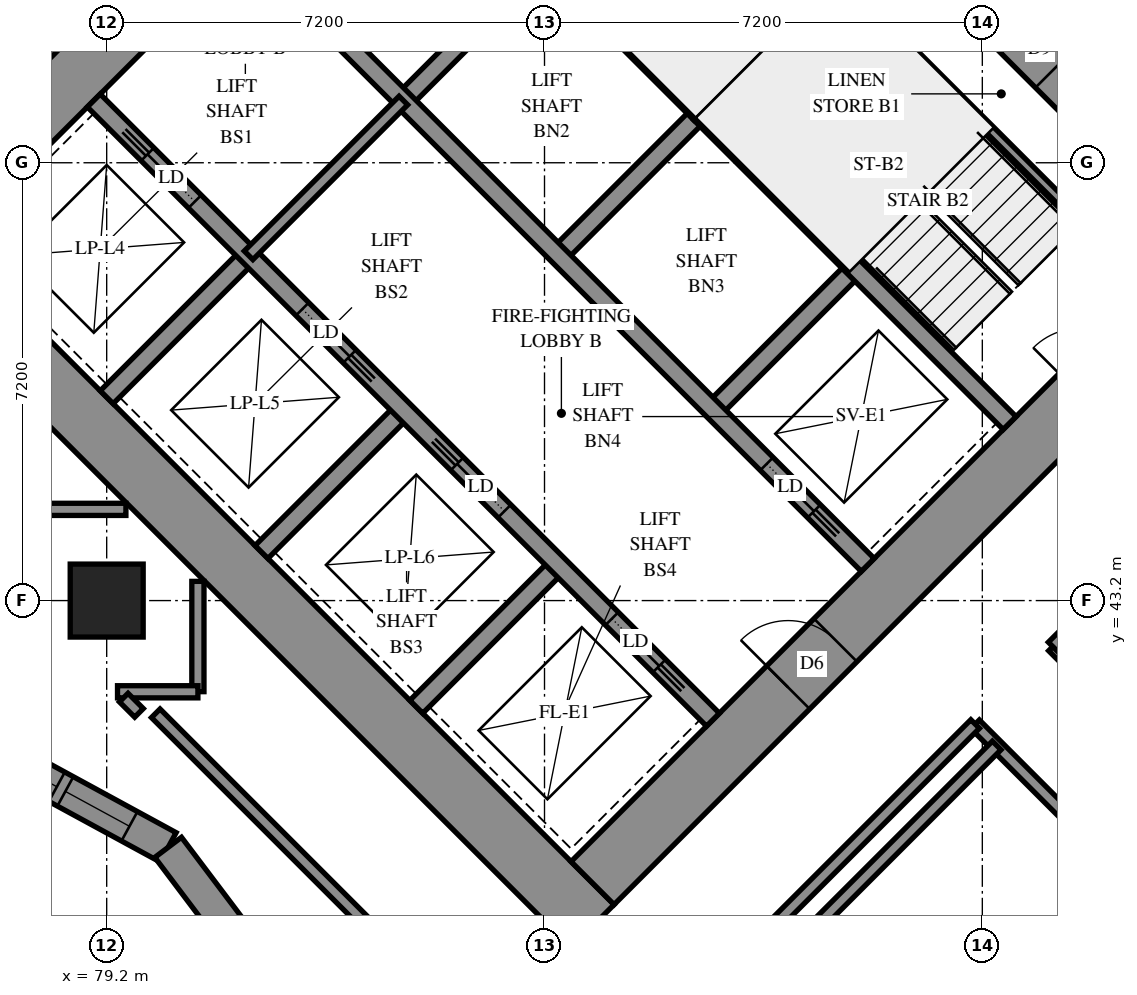
"""IFC4 building model, lengths in metres.
Left out: names, types, materials, properties, quantities, classifications, styles, units other than length and angle.
Written with IfcOpenShell. Run it as: python <this file> out.ifc"""

import sys

from ifc_helpers import new_model, si_unit, direction, frame, frame_2d, origin, origin_2d, place, context, subcontext, project, spatial, polyline, rectangle, outline, extrude, element, fill, save


model = new_model("IFC4")
c1 = context("Model", 3, precision=1e-05, world=origin(), true_north=direction((0.0, 1.0)))
c2 = subcontext(c1, "Body", "Model", "MODEL_VIEW")
j1 = project(units=[si_unit("LENGTHUNIT", "METRE"), si_unit("PLANEANGLEUNIT", "RADIAN")], contexts=[c1])
p1 = place(None, origin())
s1 = spatial("IfcSite", under=j1, at=p1, CompositionType="ELEMENT")
p2 = place(p1, origin())
s2 = spatial("IfcBuilding", under=s1, at=p2, CompositionType="ELEMENT")
p3 = place(p2, frame((0.0, 0.0, 54.2)))
s3 = spatial("IfcBuildingStorey", under=s2, at=p3, CompositionType="ELEMENT", Elevation=54.2)
p4 = place(p3, frame((79.2, 43.2, 0.0), z_axis=(0.0, 0.0, 1.0), x_axis=(1.0, 0.0, 0.0)))
e1 = element("IfcColumn", 1, at=p4, inside=s3, PredefinedType="COLUMN", context=c2, shape_type="SweptSolid", body=[
    extrude(rectangle(XDim=1.2, YDim=1.2, at=origin_2d()), origin(), (0.0, 0.0, 1.0), 3.1),
])
p5 = place(p3, frame((75.594, 49.443, -0.3), z_axis=(0.0, 0.0, 1.0), x_axis=(0.7071037324, -0.70710983, 0.0)))
e2 = element("IfcWall", 2, at=p5, inside=s3, PredefinedType="SHEAR", context=c2, shape_type="SweptSolid", body=[
    extrude(rectangle(XDim=16.4, YDim=1.0, at=frame_2d((8.2, 0.0))), origin(), (0.0, 0.0, 1.0), 2.7),
])
p6 = place(p3, frame((86.483, 60.333, -0.3), z_axis=(0.0, 0.0, 1.0), x_axis=(0.70710983, -0.7071037324, 0.0)))
e3 = element("IfcWall", 3, at=p6, inside=s3, PredefinedType="SHEAR", context=c2, shape_type="SweptSolid", body=[
    extrude(rectangle(XDim=16.4, YDim=1.0, at=frame_2d((8.2, 0.0))), origin(), (0.0, 0.0, 1.0), 2.7),
])
p7 = place(p6, frame((11.0, 0.0, 0.3)))
e4 = element("IfcOpeningElement", 4, at=p7, cuts=e3, PredefinedType="OPENING", context=c2, shape_type="SweptSolid", body=[
    extrude(rectangle(XDim=0.8, YDim=2.1, at=frame_2d((0.4, 1.05))), frame((0.0, 0.51, 0.0), z_axis=(0.0, -1.0, 0.0), x_axis=(1.0, 0.0, 0.0)), (0.0, 0.0, 1.0), 1.02),
])
p8 = place(p3, frame((76.301, 49.443, -0.3), z_axis=(0.0, 0.0, 1.0), x_axis=(0.7071067812, 0.7071067812, 0.0)))
e5 = element("IfcWall", 5, at=p8, inside=s3, PredefinedType="SHEAR", context=c2, shape_type="SweptSolid", body=[
    extrude(rectangle(XDim=14.4, YDim=1.0, at=frame_2d((7.2, 0.0))), origin(), (0.0, 0.0, 1.0), 2.7),
])
p9 = place(p8, frame((4.55, 0.0, 0.3)))
e6 = element("IfcOpeningElement", 6, at=p9, cuts=e5, PredefinedType="OPENING", context=c2, shape_type="SweptSolid", body=[
    extrude(rectangle(XDim=1.1, YDim=2.1, at=frame_2d((0.55, 1.05))), frame((0.0, 0.51, 0.0), z_axis=(0.0, -1.0, 0.0), x_axis=(1.0, 0.0, 0.0)), (0.0, 0.0, 1.0), 1.02),
])
p10 = place(p8, frame((11.35, 0.0, 0.3)))
e7 = element("IfcOpeningElement", 7, at=p10, cuts=e5, PredefinedType="OPENING", context=c2, shape_type="SweptSolid", body=[
    extrude(rectangle(XDim=1.1, YDim=2.1, at=frame_2d((0.55, 1.05))), frame((0.0, 0.51, 0.0), z_axis=(0.0, -1.0, 0.0), x_axis=(1.0, 0.0, 0.0)), (0.0, 0.0, 1.0), 1.02),
])
p11 = place(p3, frame((87.19, 38.554, -0.3), z_axis=(0.0, 0.0, 1.0), x_axis=(0.707103309, 0.7071102534, 0.0)))
e8 = element("IfcWall", 8, at=p11, inside=s3, PredefinedType="SHEAR", context=c2, shape_type="SweptSolid", body=[
    extrude(rectangle(XDim=14.4, YDim=1.0, at=frame_2d((7.2, 0.0))), origin(), (0.0, 0.0, 1.0), 2.7),
])
p12 = place(p11, frame((4.55, 0.0, 0.3)))
e9 = element("IfcOpeningElement", 9, at=p12, cuts=e8, PredefinedType="OPENING", context=c2, shape_type="SweptSolid", body=[
    extrude(rectangle(XDim=1.1, YDim=2.1, at=frame_2d((0.55, 1.05))), frame((0.0, 0.51, 0.0), z_axis=(0.0, -1.0, 0.0), x_axis=(1.0, 0.0, 0.0)), (0.0, 0.0, 1.0), 1.02),
])
p13 = place(p11, frame((11.35, 0.0, 0.3)))
e10 = element("IfcOpeningElement", 10, at=p13, cuts=e8, PredefinedType="OPENING", context=c2, shape_type="SweptSolid", body=[
    extrude(rectangle(XDim=1.1, YDim=2.1, at=frame_2d((0.55, 1.05))), frame((0.0, 0.51, 0.0), z_axis=(0.0, -1.0, 0.0), x_axis=(1.0, 0.0, 0.0)), (0.0, 0.0, 1.0), 1.02),
])
for number, where, z_axis, x_axis in (
    (11, (79.2, 46.544, 0.0), (0.0, 0.0, 1.0), (0.707, 0.707, 0.0)),
    (12, (84.079, 51.423, 0.0), (0.0, 0.0, 1.0), (0.707, 0.707, 0.0)),
):
    element("IfcWall", number, at=place(p3, frame(where, z_axis=z_axis, x_axis=x_axis)), inside=s3, PredefinedType="SOLIDWALL", context=c2, shape_type="SweptSolid", body=[
        extrude(rectangle(XDim=3.3, YDim=0.3, at=frame_2d((1.65, 0.0))), origin(), (0.0, 0.0, 1.0), 3.1),
    ])
p14 = place(p3, frame((81.746, 43.999, 0.0), z_axis=(0.0, 0.0, 1.0), x_axis=(0.7071067812, 0.7071067812, 0.0)))
e13 = element("IfcWall", 13, at=p14, inside=s3, PredefinedType="SOLIDWALL", context=c2, shape_type="SweptSolid", body=[
    extrude(rectangle(XDim=3.3, YDim=0.3, at=frame_2d((1.65, 0.0))), origin(), (0.0, 0.0, 1.0), 3.1),
])
p15 = place(p3, frame((86.625, 48.878, 0.0), z_axis=(0.0, 0.0, 1.0), x_axis=(0.7071067812, 0.7071067812, 0.0)))
e14 = element("IfcWall", 14, at=p15, inside=s3, PredefinedType="SOLIDWALL", context=c2, shape_type="SweptSolid", body=[
    extrude(rectangle(XDim=3.3, YDim=0.3, at=frame_2d((1.65, 0.0))), origin(), (0.0, 0.0, 1.0), 3.1),
])
p16 = place(p3, frame((84.291, 41.453, 0.0), z_axis=(0.0, 0.0, 1.0), x_axis=(0.7071067812, 0.7071067812, 0.0)))
e15 = element("IfcWall", 15, at=p16, inside=s3, PredefinedType="SOLIDWALL", context=c2, shape_type="SweptSolid", body=[
    extrude(rectangle(XDim=3.3, YDim=0.3, at=frame_2d((1.65, 0.0))), origin(), (0.0, 0.0, 1.0), 3.1),
])
p17 = place(p3, frame((89.17, 46.332, 0.0), z_axis=(0.0, 0.0, 1.0), x_axis=(0.7071067812, 0.7071067812, 0.0)))
e16 = element("IfcWall", 16, at=p17, inside=s3, PredefinedType="SOLIDWALL", context=c2, shape_type="SweptSolid", body=[
    extrude(rectangle(XDim=3.3, YDim=0.3, at=frame_2d((1.65, 0.0))), origin(), (0.0, 0.0, 1.0), 3.1),
])
p18 = place(p3, frame((78.988, 51.423, 0.0), z_axis=(0.0, 0.0, 1.0), x_axis=(0.7071067812, -0.7071067812, 0.0)))
e17 = element("IfcWall", 17, at=p18, inside=s3, PredefinedType="SOLIDWALL", context=c2, shape_type="SweptSolid", body=[
    extrude(rectangle(XDim=14.4, YDim=0.3, at=frame_2d((7.2, 0.0))), origin(), (0.0, 0.0, 1.0), 3.1),
])
p19 = place(p18, frame((1.25, 0.0, 0.0)))
e18 = element("IfcOpeningElement", 18, at=p19, cuts=e17, PredefinedType="OPENING", context=c2, shape_type="SweptSolid", body=[
    extrude(rectangle(XDim=1.1, YDim=2.1, at=frame_2d((0.55, 1.05))), frame((0.0, 0.16, 0.0), z_axis=(0.0, -1.0, 0.0), x_axis=(1.0, 0.0, 0.0)), (0.0, 0.0, 1.0), 0.32),
])
p20 = place(p18, frame((4.85, 0.0, 0.0)))
e19 = element("IfcOpeningElement", 19, at=p20, cuts=e17, PredefinedType="OPENING", context=c2, shape_type="SweptSolid", body=[
    extrude(rectangle(XDim=1.1, YDim=2.1, at=frame_2d((0.55, 1.05))), frame((0.0, 0.16, 0.0), z_axis=(0.0, -1.0, 0.0), x_axis=(1.0, 0.0, 0.0)), (0.0, 0.0, 1.0), 0.32),
])
p21 = place(p18, frame((8.45, 0.0, 0.0)))
e20 = element("IfcOpeningElement", 20, at=p21, cuts=e17, PredefinedType="OPENING", context=c2, shape_type="SweptSolid", body=[
    extrude(rectangle(XDim=1.1, YDim=2.1, at=frame_2d((0.55, 1.05))), frame((0.0, 0.16, 0.0), z_axis=(0.0, -1.0, 0.0), x_axis=(1.0, 0.0, 0.0)), (0.0, 0.0, 1.0), 0.32),
])
p22 = place(p18, frame((12.05, 0.0, 0.0)))
e21 = element("IfcOpeningElement", 21, at=p22, cuts=e17, PredefinedType="OPENING", context=c2, shape_type="SweptSolid", body=[
    extrude(rectangle(XDim=1.1, YDim=2.1, at=frame_2d((0.55, 1.05))), frame((0.0, 0.16, 0.0), z_axis=(0.0, -1.0, 0.0), x_axis=(1.0, 0.0, 0.0)), (0.0, 0.0, 1.0), 0.32),
])
p23 = place(p3, frame((81.534, 53.969, 0.0), z_axis=(0.0, 0.0, 1.0), x_axis=(0.707103309, -0.7071102534, 0.0)))
e22 = element("IfcWall", 22, at=p23, inside=s3, PredefinedType="SOLIDWALL", context=c2, shape_type="SweptSolid", body=[
    extrude(rectangle(XDim=14.4, YDim=0.3, at=frame_2d((7.2, 0.0))), origin(), (0.0, 0.0, 1.0), 3.1),
])
p24 = place(p23, frame((12.05, 0.0, 0.0)))
e23 = element("IfcOpeningElement", 23, at=p24, cuts=e22, PredefinedType="OPENING", context=c2, shape_type="SweptSolid", body=[
    extrude(rectangle(XDim=1.1, YDim=2.1, at=frame_2d((0.55, 1.05))), frame((0.0, 0.16, 0.0), z_axis=(0.0, -1.0, 0.0), x_axis=(1.0, 0.0, 0.0)), (0.0, 0.0, 1.0), 0.32),
])
for number, where, z_axis, x_axis in (
    (24, (83.867, 56.302, 0.0), (0.0, 0.0, 1.0), (0.707, -0.707, 0.0)),
    (25, (88.958, 51.211, 0.0), (0.0, 0.0, 1.0), (0.707, -0.707, 0.0)),
):
    element("IfcWall", number, at=place(p3, frame(where, z_axis=z_axis, x_axis=x_axis)), inside=s3, PredefinedType="SOLIDWALL", context=c2, shape_type="SweptSolid", body=[
        extrude(rectangle(XDim=7.2, YDim=0.3, at=frame_2d((3.6, 0.0))), origin(), (0.0, 0.0, 1.0), 3.1),
    ])
p25 = place(p3, frame((88.958, 51.211, 0.0), z_axis=(0.0, 0.0, 1.0), x_axis=(0.7071067812, 0.7071067812, 0.0)))
e26 = element("IfcWall", 26, at=p25, inside=s3, PredefinedType="SOLIDWALL", context=c2, shape_type="SweptSolid", body=[
    extrude(rectangle(XDim=4.2, YDim=0.3, at=frame_2d((2.1, 0.0))), origin(), (0.0, 0.0, 1.0), 3.1),
])
p26 = place(p3, frame((76.593, 41.111, 0.0), z_axis=(0.0, 0.0, 1.0), x_axis=(0.8783220539, -0.4780694193, 0.0)))
e27 = element("IfcWall", 27, at=p26, inside=s3, PredefinedType="SOLIDWALL", context=c2, shape_type="SweptSolid", body=[
    extrude(outline(polyline([(0.024, -0.275), (4.059, -0.275), (4.178, 0.275), (-0.024, 0.275), (0.024, -0.275)])), origin(), (0.0, 0.0, 1.0), 3.1),
])
p27 = place(p26, frame((0.835, 0.0, 0.5)))
e28 = element("IfcOpeningElement", 28, at=p27, cuts=e27, PredefinedType="OPENING", context=c2, shape_type="SweptSolid", body=[
    extrude(rectangle(XDim=1.2, YDim=2.45, at=frame_2d((0.6, 1.225))), frame((0.0, 0.285, 0.0), z_axis=(0.0, -1.0, 0.0), x_axis=(1.0, 0.0, 0.0)), (0.0, 0.0, 1.0), 0.57),
])
p28 = place(p26, frame((2.194, 0.0, 0.5)))
e29 = element("IfcOpeningElement", 29, at=p28, cuts=e27, PredefinedType="OPENING", context=c2, shape_type="SweptSolid", body=[
    extrude(rectangle(XDim=1.2, YDim=2.45, at=frame_2d((0.6, 1.225))), frame((0.0, 0.285, 0.0), z_axis=(0.0, -1.0, 0.0), x_axis=(1.0, 0.0, 0.0)), (0.0, 0.0, 1.0), 0.57),
])
p29 = place(p3, frame((80.211, 39.142, 0.0), z_axis=(0.0, 0.0, 1.0), x_axis=(0.6022049527, -0.7983415278, 0.0)))
e30 = element("IfcWall", 30, at=p29, inside=s3, PredefinedType="SOLIDWALL", context=c2, shape_type="SweptSolid", body=[
    extrude(outline(polyline([(0.059, -0.275), (3.967, -0.275), (3.89, 0.275), (-0.059, 0.275), (0.059, -0.275)])), origin(), (0.0, 0.0, 1.0), 3.1),
])
p30 = place(p29, frame((1.877, 0.0, 0.5)))
e31 = element("IfcOpeningElement", 31, at=p30, cuts=e30, PredefinedType="OPENING", context=c2, shape_type="SweptSolid", body=[
    extrude(rectangle(XDim=1.2, YDim=2.45, at=frame_2d((0.6, 1.225))), frame((0.0, 0.285, 0.0), z_axis=(0.0, -1.0, 0.0), x_axis=(1.0, 0.0, 0.0)), (0.0, 0.0, 1.0), 0.57),
])
p31 = place(p3, frame((91.313, 53.354, 0.0), z_axis=(0.0, 0.0, 1.0), x_axis=(0.7071147811, -0.7070987812, 0.0)))
e32 = element("IfcWall", 32, at=p31, inside=s3, PredefinedType="PARTITIONING", context=c2, shape_type="SweptSolid", body=[
    extrude(rectangle(XDim=6.25, YDim=0.15, at=frame_2d((3.125, 0.0))), origin(), (0.0, 0.0, 1.0), 3.1),
])
p32 = place(p3, frame((81.534, 48.878, 0.0), z_axis=(0.0, 0.0, 1.0), x_axis=(0.707092892, 0.7071206701, 0.0)))
e33 = element("IfcWall", 33, at=p32, inside=s3, PredefinedType="PARTITIONING", context=c2, shape_type="SweptSolid", body=[
    extrude(rectangle(XDim=3.6, YDim=0.2, at=frame_2d((1.8, 0.0))), origin(), (0.0, 0.0, 1.0), 3.1),
])
p33 = place(p3, frame((93.481, 41.167, 0.0), z_axis=(0.0, 0.0, 1.0), x_axis=(0.7071067812, -0.7071067812, 0.0)))
e34 = element("IfcWall", 34, at=p33, inside=s3, PredefinedType="PARTITIONING", context=c2, shape_type="SweptSolid", body=[
    extrude(rectangle(XDim=25.699, YDim=0.2, at=frame_2d((12.85, 0.0))), origin(), (0.0, 0.0, 1.0), 3.1),
])
p34 = place(p33, frame((2.8, 0.0, 0.0)))
e35 = element("IfcOpeningElement", 35, at=p34, cuts=e34, PredefinedType="OPENING", context=c2, shape_type="SweptSolid", body=[
    extrude(rectangle(XDim=0.9, YDim=2.1, at=frame_2d((0.45, 1.05))), frame((0.0, 0.11, 0.0), z_axis=(0.0, -1.0, 0.0), x_axis=(1.0, 0.0, 0.0)), (0.0, 0.0, 1.0), 0.22),
])
p35 = place(p33, frame((9.948, 0.0, 0.0)))
e36 = element("IfcOpeningElement", 36, at=p35, cuts=e34, PredefinedType="OPENING", context=c2, shape_type="SweptSolid", body=[
    extrude(rectangle(XDim=0.9, YDim=2.1, at=frame_2d((0.45, 1.05))), frame((0.0, 0.11, 0.0), z_axis=(0.0, -1.0, 0.0), x_axis=(1.0, 0.0, 0.0)), (0.0, 0.0, 1.0), 0.22),
])
p36 = place(p33, frame((11.7, 0.0, 0.0)))
e37 = element("IfcOpeningElement", 37, at=p36, cuts=e34, PredefinedType="OPENING", context=c2, shape_type="SweptSolid", body=[
    extrude(rectangle(XDim=0.9, YDim=2.1, at=frame_2d((0.45, 1.05))), frame((0.0, 0.11, 0.0), z_axis=(0.0, -1.0, 0.0), x_axis=(1.0, 0.0, 0.0)), (0.0, 0.0, 1.0), 0.22),
])
p37 = place(p33, frame((17.25, 0.0, 0.0)))
e38 = element("IfcOpeningElement", 38, at=p37, cuts=e34, PredefinedType="OPENING", context=c2, shape_type="SweptSolid", body=[
    extrude(rectangle(XDim=0.9, YDim=2.1, at=frame_2d((0.45, 1.05))), frame((0.0, 0.11, 0.0), z_axis=(0.0, -1.0, 0.0), x_axis=(1.0, 0.0, 0.0)), (0.0, 0.0, 1.0), 0.22),
])
p38 = place(p33, frame((22.82, 0.0, 0.0)))
e39 = element("IfcOpeningElement", 39, at=p38, cuts=e34, PredefinedType="OPENING", context=c2, shape_type="SweptSolid", body=[
    extrude(rectangle(XDim=0.9, YDim=2.1, at=frame_2d((0.45, 1.05))), frame((0.0, 0.11, 0.0), z_axis=(0.0, -1.0, 0.0), x_axis=(1.0, 0.0, 0.0)), (0.0, 0.0, 1.0), 0.22),
])
p39 = place(p3, frame((86.312, 33.293, 0.0), z_axis=(0.0, 0.0, 1.0), x_axis=(0.7071067812, 0.7071067812, 0.0)))
e40 = element("IfcWall", 40, at=p39, inside=s3, PredefinedType="PARTITIONING", context=c2, shape_type="SweptSolid", body=[
    extrude(rectangle(XDim=10.641, YDim=0.2, at=frame_2d((5.321, 0.0))), origin(), (0.0, 0.0, 1.0), 3.1),
])
p40 = place(p3, frame((94.761, 42.446, 0.0), z_axis=(0.0, 0.0, 1.0), x_axis=(0.7071067812, -0.7071067812, 0.0)))
e41 = element("IfcWall", 41, at=p40, inside=s3, PredefinedType="PARTITIONING", context=c2, shape_type="SweptSolid", body=[
    extrude(rectangle(XDim=9.597, YDim=0.2, at=frame_2d((4.798, 0.0))), origin(), (0.0, 0.0, 1.0), 3.1),
])
p41 = place(p40, frame((2.851, 0.0, 0.0)))
e42 = element("IfcOpeningElement", 42, at=p41, cuts=e41, PredefinedType="OPENING", context=c2, shape_type="SweptSolid", body=[
    extrude(rectangle(XDim=0.9, YDim=2.1, at=frame_2d((0.45, 1.05))), frame((0.0, 0.11, 0.0), z_axis=(0.0, -1.0, 0.0), x_axis=(1.0, 0.0, 0.0)), (0.0, 0.0, 1.0), 0.22),
])
for number, where, z_axis, x_axis in (
    (43, (86.836, 34.524, 0.0), (0.0, 0.0, 1.0), (0.707, 0.707, 0.0)),
    (44, (94.757, 42.445, 0.0), (0.0, 0.0, 1.0), (0.707, 0.707, 0.0)),
):
    element("IfcWall", number, at=place(p3, frame(where, z_axis=z_axis, x_axis=x_axis)), inside=s3, PredefinedType="PARTITIONING", context=c2, shape_type="SweptSolid", body=[
        extrude(rectangle(XDim=9.399, YDim=0.2, at=frame_2d((4.699, 0.0))), origin(), (0.0, 0.0, 1.0), 3.1),
    ])
p42 = place(p3, frame((94.363, 56.123, 0.0), z_axis=(0.0, 0.0, 1.0), x_axis=(0.7071067812, -0.7071067812, 0.0)))
e45 = element("IfcWall", 45, at=p42, inside=s3, PredefinedType="PARTITIONING", context=c2, shape_type="SweptSolid", body=[
    extrude(rectangle(XDim=6.503, YDim=0.2, at=frame_2d((3.251, 0.0))), origin(), (0.0, 0.0, 1.0), 3.1),
])
p43 = place(p3, frame((80.007, 41.347, 0.0), z_axis=(0.0, 0.0, 1.0), x_axis=(0.7071067812, -0.7071067812, 0.0)))
e46 = element("IfcWall", 46, at=p43, inside=s3, PredefinedType="PARTITIONING", context=c2, shape_type="SweptSolid", body=[
    extrude(rectangle(XDim=6.206, YDim=0.2, at=frame_2d((3.103, 0.0))), origin(), (0.0, 0.0, 1.0), 3.1),
])
for number, where, z_axis, x_axis in (
    (47, (77.702, 44.7, 0.0), (0.0, 0.0, 1.0), (1.0, 0.0, 0.0)),
    (48, (80.7, 41.702, 0.0), (0.0, 0.0, 1.0), (0.0, 1.0, 0.0)),
):
    element("IfcWall", number, at=place(p3, frame(where, z_axis=z_axis, x_axis=x_axis)), inside=s3, PredefinedType="PARTITIONING", context=c2, shape_type="SweptSolid", body=[
        extrude(rectangle(XDim=1.814, YDim=0.2, at=frame_2d((0.907, 0.0))), origin(), (0.0, 0.0, 1.0), 3.1),
    ])
p44 = place(p3, frame((79.378, 41.7, 0.0), z_axis=(0.0, 0.0, 1.0), x_axis=(1.0, 0.0, 0.0)))
e49 = element("IfcWall", 49, at=p44, inside=s3, PredefinedType="PARTITIONING", context=c2, shape_type="SweptSolid", body=[
    extrude(rectangle(XDim=1.322, YDim=0.2, at=frame_2d((0.661, 0.0))), origin(), (0.0, 0.0, 1.0), 3.1),
])
p45 = place(p3, frame((79.481, 41.605, 0.0), z_axis=(0.0, 0.0, 1.0), x_axis=(0.7071067812, -0.7071067812, 0.0)))
e50 = element("IfcWall", 50, at=p45, inside=s3, PredefinedType="PARTITIONING", context=c2, shape_type="SweptSolid", body=[
    extrude(rectangle(XDim=0.355, YDim=0.2, at=frame_2d((0.177, 0.0))), origin(), (0.0, 0.0, 1.0), 3.1),
])
p46 = place(p27, origin())
e51 = element("IfcWindow", 51, at=p46, inside=s3, PartitioningType="SINGLE_PANEL", PredefinedType="WINDOW", context=c2, shape_type="SweptSolid", body=[
    extrude(rectangle(XDim=1.2, YDim=2.45, at=frame_2d((0.6, 1.225))), frame((0.0, 0.155, 0.0), z_axis=(0.0, -1.0, 0.0), x_axis=(1.0, 0.0, 0.0)), (0.0, 0.0, 1.0), 0.06),
])
fill(e28, e51)
p47 = place(p28, origin())
e52 = element("IfcWindow", 52, at=p47, inside=s3, PartitioningType="SINGLE_PANEL", PredefinedType="WINDOW", context=c2, shape_type="SweptSolid", body=[
    extrude(rectangle(XDim=1.2, YDim=2.45, at=frame_2d((0.6, 1.225))), frame((0.0, 0.155, 0.0), z_axis=(0.0, -1.0, 0.0), x_axis=(1.0, 0.0, 0.0)), (0.0, 0.0, 1.0), 0.06),
])
fill(e29, e52)
p48 = place(p7, origin())
e53 = element("IfcDoor", 53, at=p48, inside=s3, OperationType="SINGLE_SWING_RIGHT", PredefinedType="DOOR", context=c2, shape_type="SweptSolid", body=[
    extrude(rectangle(XDim=0.8, YDim=2.1, at=frame_2d((0.4, 1.05))), frame((0.0, -0.44, 0.0), z_axis=(0.0, -1.0, 0.0), x_axis=(1.0, 0.0, 0.0)), (0.0, 0.0, 1.0), 0.05),
])
fill(e4, e53)
p49 = place(p12, origin())
e54 = element("IfcDoor", 54, at=p49, inside=s3, OperationType="DOUBLE_DOOR_SINGLE_SWING", PredefinedType="DOOR", context=c2, shape_type="SweptSolid", body=[
    extrude(rectangle(XDim=1.1, YDim=2.1, at=frame_2d((0.55, 1.05))), frame((0.0, 0.025, 0.0), z_axis=(0.0, -1.0, 0.0), x_axis=(1.0, 0.0, 0.0)), (0.0, 0.0, 1.0), 0.05),
])
fill(e9, e54)
p50 = place(p19, origin())
e55 = element("IfcDoor", 55, at=p50, inside=s3, OperationType="SLIDING_TO_LEFT", PredefinedType="DOOR", context=c2, shape_type="SweptSolid", body=[
    extrude(rectangle(XDim=1.1, YDim=2.1, at=frame_2d((0.55, 1.05))), frame((0.0, 0.025, 0.0), z_axis=(0.0, -1.0, 0.0), x_axis=(1.0, 0.0, 0.0)), (0.0, 0.0, 1.0), 0.05),
])
fill(e18, e55)
p51 = place(p20, origin())
e56 = element("IfcDoor", 56, at=p51, inside=s3, OperationType="SLIDING_TO_RIGHT", PredefinedType="DOOR", context=c2, shape_type="SweptSolid", body=[
    extrude(rectangle(XDim=1.1, YDim=2.1, at=frame_2d((0.55, 1.05))), frame((0.0, 0.025, 0.0), z_axis=(0.0, -1.0, 0.0), x_axis=(1.0, 0.0, 0.0)), (0.0, 0.0, 1.0), 0.05),
])
fill(e19, e56)
p52 = place(p21, origin())
e57 = element("IfcDoor", 57, at=p52, inside=s3, OperationType="SLIDING_TO_LEFT", PredefinedType="DOOR", context=c2, shape_type="SweptSolid", body=[
    extrude(rectangle(XDim=1.1, YDim=2.1, at=frame_2d((0.55, 1.05))), frame((0.0, 0.025, 0.0), z_axis=(0.0, -1.0, 0.0), x_axis=(1.0, 0.0, 0.0)), (0.0, 0.0, 1.0), 0.05),
])
fill(e20, e57)
p53 = place(p22, origin())
e58 = element("IfcDoor", 58, at=p53, inside=s3, OperationType="SLIDING_TO_RIGHT", PredefinedType="DOOR", context=c2, shape_type="SweptSolid", body=[
    extrude(rectangle(XDim=1.1, YDim=2.1, at=frame_2d((0.55, 1.05))), frame((0.0, 0.025, 0.0), z_axis=(0.0, -1.0, 0.0), x_axis=(1.0, 0.0, 0.0)), (0.0, 0.0, 1.0), 0.05),
])
fill(e21, e58)
p54 = place(p24, origin())
e59 = element("IfcDoor", 59, at=p54, inside=s3, OperationType="SLIDING_TO_RIGHT", PredefinedType="DOOR", context=c2, shape_type="SweptSolid", body=[
    extrude(rectangle(XDim=1.1, YDim=2.1, at=frame_2d((0.55, 1.05))), frame((0.0, 0.025, 0.0), z_axis=(0.0, -1.0, 0.0), x_axis=(1.0, 0.0, 0.0)), (0.0, 0.0, 1.0), 0.05),
])
fill(e23, e59)
save(model, sys.argv[1])
